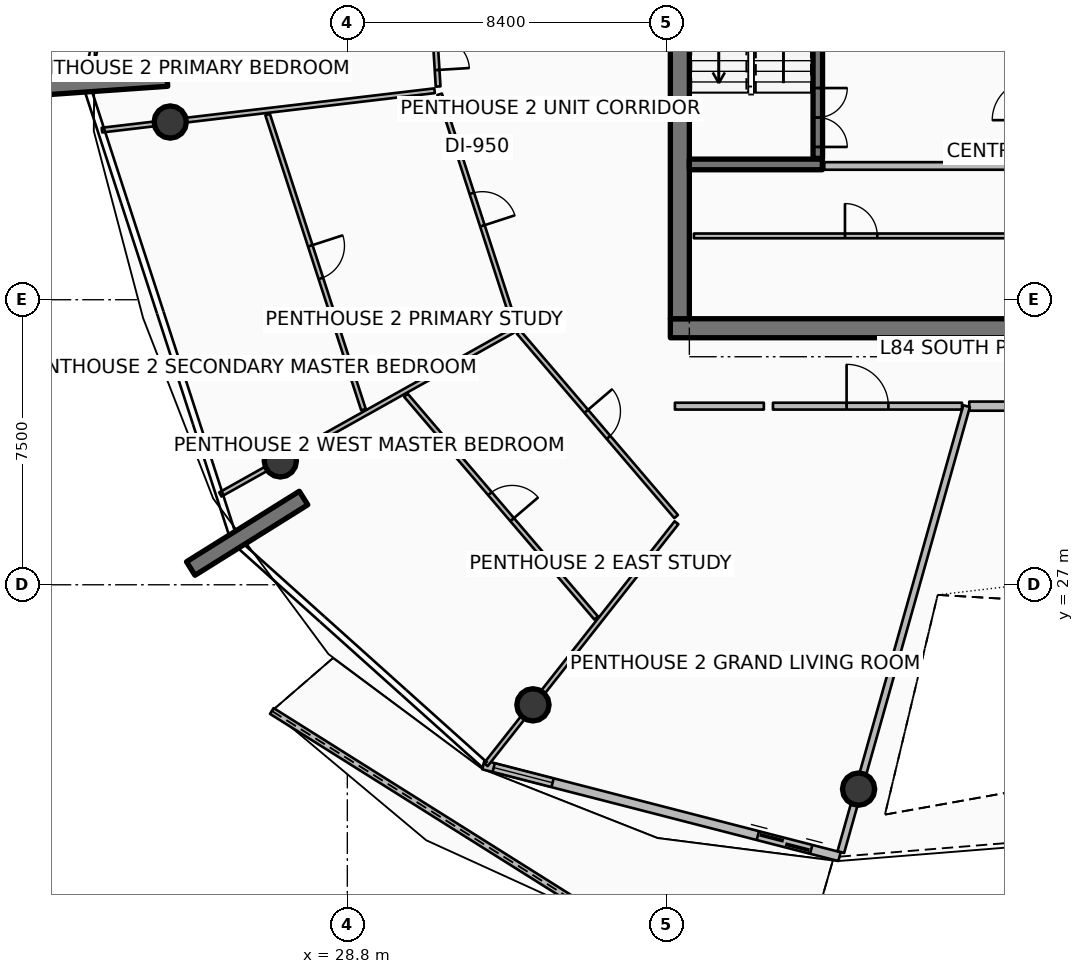
"""IFC4 building model, lengths in metres.
Left out: names, types, materials, properties, quantities, classifications, styles, units other than length and angle.
Written with IfcOpenShell. Run it as: python <this file> out.ifc"""

import sys

from ifc_helpers import new_model, si_unit, direction, frame, frame_2d, origin, origin_2d, place, context, subcontext, project, spatial, polyline, rectangle, circle, outline, extrude, element, fill, save


model = new_model("IFC4")
c1 = context("Model", 3, precision=1e-05, world=origin(), true_north=direction((0.0, 1.0)))
c2 = subcontext(c1, "Body", "Model", "MODEL_VIEW")
j1 = project(units=[si_unit("LENGTHUNIT", "METRE"), si_unit("PLANEANGLEUNIT", "RADIAN")], contexts=[c1])
p1 = place(None, origin())
s1 = spatial("IfcSite", under=j1, at=p1, CompositionType="ELEMENT")
p2 = place(p1, origin())
s2 = spatial("IfcBuilding", under=s1, at=p2, CompositionType="ELEMENT")
p3 = place(p2, frame((0.0, 0.0, 334.7)))
s3 = spatial("IfcBuildingStorey", under=s2, at=p3, CompositionType="ELEMENT", Elevation=334.7)
p4 = place(p3, frame((37.3, 33.75, 0.0), z_axis=(0.0, 0.0, 1.0), x_axis=(1.0, 0.0, 0.0)))
e1 = element("IfcWall", 1, at=p4, inside=s3, PredefinedType="SHEAR", context=c2, shape_type="SweptSolid", body=[
    extrude(rectangle(XDim=9.6, YDim=0.5, at=frame_2d((4.8, 0.0))), origin(), (0.0, 0.0, 1.0), 4.2),
])
p5 = place(p3, frame((37.55, 34.0, 0.0), z_axis=(0.0, 0.0, 1.0), x_axis=(0.0, 1.0, 0.0)))
e2 = element("IfcWall", 2, at=p5, inside=s3, PredefinedType="SHEAR", context=c2, shape_type="SweptSolid", body=[
    extrude(rectangle(XDim=16.0, YDim=0.5, at=frame_2d((8.0, 0.0))), origin(), (0.0, 0.0, 1.0), 4.2),
])
p6 = place(p3, frame((37.8, 38.06, 0.0), z_axis=(0.0, 0.0, 1.0), x_axis=(1.0, 0.0, 0.0)))
e3 = element("IfcWall", 3, at=p6, inside=s3, PredefinedType="SHEAR", context=c2, shape_type="SweptSolid", body=[
    extrude(rectangle(XDim=3.5, YDim=0.28, at=frame_2d((1.75, 0.0))), origin(), (0.0, 0.0, 1.0), 4.2),
])
for number, where, z_axis, x_axis in (
    (4, (24.059, 40.326, 0.0), (0.0, 0.0, 1.0), (-0.998, -0.07, 0.0)),
    (5, (27.647, 29.282, 0.0), (0.0, 0.0, 1.0), (-0.848, -0.53, 0.0)),
):
    element("IfcWall", number, at=place(p3, frame(where, z_axis=z_axis, x_axis=x_axis)), inside=s3, PredefinedType="SOLIDWALL", context=c2, shape_type="SweptSolid", body=[
        extrude(rectangle(XDim=3.5, YDim=0.42, at=frame_2d((1.75, 0.0))), origin(), (0.0, 0.0, 1.0), 4.2),
    ])
for number, where, z_axis, x_axis in (
    (6, (24.14, 39.176, 0.0), (0.0, 0.0, 1.0), (1.0, 0.0, 0.0)),
    (7, (27.037, 30.26, 0.0), (0.0, 0.0, 1.0), (1.0, 0.0, 0.0)),
    (8, (33.684, 23.841, 0.0), (0.0, 0.0, 1.0), (1.0, 0.0, 0.0)),
    (9, (42.253, 21.624, 0.0), (0.0, 0.0, 1.0), (1.0, 0.0, 0.0)),
):
    element("IfcColumn", number, at=place(p3, frame(where, z_axis=z_axis, x_axis=x_axis)), inside=s3, PredefinedType="COLUMN", context=c2, shape_type="SweptSolid", body=[
        extrude(circle(Radius=0.425, at=origin_2d()), origin(), (0.0, 0.0, 1.0), 3.94),
    ])
p7 = place(p3, frame((26.813, 23.679, 0.0), z_axis=(0.0, 0.0, 1.0), x_axis=(0.846699200114, -0.532071860302, 0.0)))
e10 = element("IfcWall", 10, at=p7, inside=s3, PredefinedType="PARAPET", context=c2, shape_type="SweptSolid", body=[
    extrude(outline(polyline([(0.0, 0.0), (10.483, 0.0), (10.483, 1.832), (5.242, 1.696), (0.0, 1.497), (0.0, 0.0)])), frame((0.0, 0.09, 0.0), z_axis=(0.0, -1.0, 0.0), x_axis=(1.0, 0.0, 0.0)), (0.0, 0.0, 1.0), 0.18),
])
p8 = place(p3, frame((32.38, 22.26, 0.0), z_axis=(0.0, 0.0, 1.0), x_axis=(0.968389062354, -0.249444630957, 0.0)))
e11 = element("IfcWall", 11, at=p8, inside=s3, PredefinedType="SOLIDWALL", context=c2, shape_type="SweptSolid", body=[
    extrude(rectangle(XDim=9.678, YDim=0.24, at=frame_2d((4.839, 0.0))), origin(), (0.0, 0.0, 1.0), 2.89),
])
p9 = place(p8, frame((7.458, 0.0, 0.0)))
e12 = element("IfcOpeningElement", 12, at=p9, cuts=e11, PredefinedType="OPENING", context=c2, shape_type="SweptSolid", body=[
    extrude(rectangle(XDim=1.45, YDim=2.15, at=frame_2d((0.725, 1.075))), frame((0.0, 0.13, 0.0), z_axis=(0.0, -1.0, 0.0), x_axis=(1.0, 0.0, 0.0)), (0.0, 0.0, 1.0), 0.26),
])
p10 = place(p8, frame((0.28, 0.0, 0.65)))
e13 = element("IfcOpeningElement", 13, at=p10, cuts=e11, PredefinedType="OPENING", context=c2, shape_type="SweptSolid", body=[
    extrude(rectangle(XDim=1.6, YDim=1.5, at=frame_2d((0.8, 0.75))), frame((0.0, 0.13, 0.0), z_axis=(0.0, -1.0, 0.0), x_axis=(1.0, 0.0, 0.0)), (0.0, 0.0, 1.0), 0.26),
])
p11 = place(p3, frame((41.18, 38.22, 0.0), z_axis=(0.0, 0.0, 1.0), x_axis=(0.0, 1.0, 0.0)))
e14 = element("IfcWall", 14, at=p11, inside=s3, PredefinedType="SOLIDWALL", context=c2, shape_type="SweptSolid", body=[
    extrude(rectangle(XDim=7.56, YDim=0.25, at=frame_2d((3.78, 0.0))), origin(), (0.0, 0.0, 1.0), 3.94),
])
p12 = place(p11, frame((0.3, 0.0, 0.0)))
e15 = element("IfcOpeningElement", 15, at=p12, cuts=e14, PredefinedType="OPENING", context=c2, shape_type="SweptSolid", body=[
    extrude(rectangle(XDim=1.55, YDim=2.15, at=frame_2d((0.775, 1.075))), frame((0.0, 0.135, 0.0), z_axis=(0.0, -1.0, 0.0), x_axis=(1.0, 0.0, 0.0)), (0.0, 0.0, 1.0), 0.27),
])
p13 = place(p3, frame((37.92, 36.18, 0.0), z_axis=(0.0, 0.0, 1.0), x_axis=(1.0, 0.0, 0.0)))
e16 = element("IfcWall", 16, at=p13, inside=s3, PredefinedType="PARTITIONING", context=c2, shape_type="SweptSolid", body=[
    extrude(rectangle(XDim=8.8, YDim=0.125, at=frame_2d((4.4, 0.0))), origin(), (0.0, 0.0, 1.0), 3.38),
])
p14 = place(p13, frame((3.975, 0.0, 0.0)))
e17 = element("IfcOpeningElement", 17, at=p14, cuts=e16, PredefinedType="OPENING", context=c2, shape_type="SweptSolid", body=[
    extrude(rectangle(XDim=0.85, YDim=2.06, at=frame_2d((0.425, 1.03))), frame((0.0, 0.073, 0.0), z_axis=(0.0, -1.0, 0.0), x_axis=(1.0, 0.0, 0.0)), (0.0, 0.0, 1.0), 0.145),
])
p15 = place(p3, frame((41.35, 38.02, 0.0), z_axis=(0.0, 0.0, 1.0), x_axis=(1.0, 0.0, 0.0)))
e18 = element("IfcWall", 18, at=p15, inside=s3, PredefinedType="PARTITIONING", context=c2, shape_type="SweptSolid", body=[
    extrude(rectangle(XDim=5.37, YDim=0.2, at=frame_2d((2.685, 0.0))), origin(), (0.0, 0.0, 1.0), 3.94),
])
p16 = place(p3, frame((45.165, 31.7, 0.0), z_axis=(0.0, 0.0, 1.0), x_axis=(1.0, 0.0, 0.0)))
e19 = element("IfcWall", 19, at=p16, inside=s3, PredefinedType="SOLIDWALL", context=c2, shape_type="SweptSolid", body=[
    extrude(rectangle(XDim=8.533, YDim=0.24, at=frame_2d((4.267, 0.0))), origin(), (0.0, 0.0, 1.0), 3.38),
])
p17 = place(p3, frame((45.095, 31.7, 0.0), z_axis=(0.0, 0.0, 1.0), x_axis=(-0.271453030279, -0.962451688321, 0.0)))
e20 = element("IfcWall", 20, at=p17, inside=s3, PredefinedType="PARTITIONING", context=c2, shape_type="SweptSolid", body=[
    extrude(rectangle(XDim=12.191, YDim=0.18, at=frame_2d((6.096, 0.0))), origin(), (0.0, 0.0, 1.0), 3.38),
])
p18 = place(p3, frame((40.0, 31.7, 0.0), z_axis=(0.0, 0.0, 1.0), x_axis=(1.0, 0.0, 0.0)))
e21 = element("IfcWall", 21, at=p18, inside=s3, PredefinedType="PARTITIONING", context=c2, shape_type="SweptSolid", body=[
    extrude(rectangle(XDim=4.975, YDim=0.18, at=frame_2d((2.488, 0.0))), origin(), (0.0, 0.0, 1.0), 3.38),
])
p19 = place(p18, frame((1.938, 0.0, 0.0)))
e22 = element("IfcOpeningElement", 22, at=p19, cuts=e21, PredefinedType="OPENING", context=c2, shape_type="SweptSolid", body=[
    extrude(rectangle(XDim=1.1, YDim=2.1, at=frame_2d((0.55, 1.05))), frame((0.0, 0.1, 0.0), z_axis=(0.0, -1.0, 0.0), x_axis=(1.0, 0.0, 0.0)), (0.0, 0.0, 1.0), 0.2),
])
p20 = place(p3, frame((31.083, 41.827, 0.0), z_axis=(0.0, 0.0, 1.0), x_axis=(0.061626842896, -0.998099259711, 0.0)))
e23 = element("IfcWall", 23, at=p20, inside=s3, PredefinedType="PARTITIONING", context=c2, shape_type="SweptSolid", body=[
    extrude(rectangle(XDim=1.719, YDim=0.125, at=frame_2d((0.86, 0.0))), origin(), (0.0, 0.0, 1.0), 3.38),
])
p21 = place(p20, frame((0.435, 0.0, 0.0)))
e24 = element("IfcOpeningElement", 24, at=p21, cuts=e23, PredefinedType="OPENING", context=c2, shape_type="SweptSolid", body=[
    extrude(rectangle(XDim=0.85, YDim=2.06, at=frame_2d((0.425, 1.03))), frame((0.0, 0.073, 0.0), z_axis=(0.0, -1.0, 0.0), x_axis=(1.0, 0.0, 0.0)), (0.0, 0.0, 1.0), 0.145),
])
p22 = place(p3, frame((31.096, 39.999, 0.0), z_axis=(0.0, 0.0, 1.0), x_axis=(-0.993069250604, -0.117530691761, 0.0)))
e25 = element("IfcWall", 25, at=p22, inside=s3, PredefinedType="PARTITIONING", context=c2, shape_type="SweptSolid", body=[
    extrude(rectangle(XDim=8.814, YDim=0.125, at=frame_2d((4.407, 0.0))), origin(), (0.0, 0.0, 1.0), 3.38),
])
p23 = place(p3, frame((31.229, 39.906, 0.0), z_axis=(0.0, 0.0, 1.0), x_axis=(0.309023798792, -0.951054305379, 0.0)))
e26 = element("IfcWall", 26, at=p23, inside=s3, PredefinedType="PARTITIONING", context=c2, shape_type="SweptSolid", body=[
    extrude(rectangle(XDim=6.383, YDim=0.125, at=frame_2d((3.191, 0.0))), origin(), (0.0, 0.0, 1.0), 3.38),
])
p24 = place(p23, frame((2.741, 0.0, 0.0)))
e27 = element("IfcOpeningElement", 27, at=p24, cuts=e26, PredefinedType="OPENING", context=c2, shape_type="SweptSolid", body=[
    extrude(rectangle(XDim=0.9, YDim=2.08, at=frame_2d((0.45, 1.04))), frame((0.0, 0.073, 0.0), z_axis=(0.0, -1.0, 0.0), x_axis=(1.0, 0.0, 0.0)), (0.0, 0.0, 1.0), 0.145),
])
p25 = place(p3, frame((26.703, 39.371, 0.0), z_axis=(0.0, 0.0, 1.0), x_axis=(0.309021134762, -0.951055170992, 0.0)))
e28 = element("IfcWall", 28, at=p25, inside=s3, PredefinedType="PARTITIONING", context=c2, shape_type="SweptSolid", body=[
    extrude(rectangle(XDim=8.161, YDim=0.125, at=frame_2d((4.081, 0.0))), origin(), (0.0, 0.0, 1.0), 3.38),
])
p26 = place(p25, frame((3.631, 0.0, 0.0)))
e29 = element("IfcOpeningElement", 29, at=p26, cuts=e28, PredefinedType="OPENING", context=c2, shape_type="SweptSolid", body=[
    extrude(rectangle(XDim=0.9, YDim=2.08, at=frame_2d((0.45, 1.04))), frame((0.0, 0.073, 0.0), z_axis=(0.0, -1.0, 0.0), x_axis=(1.0, 0.0, 0.0)), (0.0, 0.0, 1.0), 0.145),
])
p27 = place(p3, frame((37.42, 31.7, 0.0), z_axis=(0.0, 0.0, 1.0), x_axis=(1.0, 0.0, 0.0)))
e30 = element("IfcWall", 30, at=p27, inside=s3, PredefinedType="PARTITIONING", context=c2, shape_type="SweptSolid", body=[
    extrude(rectangle(XDim=2.34, YDim=0.18, at=frame_2d((1.17, 0.0))), origin(), (0.0, 0.0, 1.0), 3.38),
])
p28 = place(p3, frame((33.148, 33.683, 0.0), z_axis=(0.0, 0.0, 1.0), x_axis=(-0.872504598877, -0.488605899409, 0.0)))
e31 = element("IfcWall", 31, at=p28, inside=s3, PredefinedType="PARTITIONING", context=c2, shape_type="SweptSolid", body=[
    extrude(rectangle(XDim=8.814, YDim=0.125, at=frame_2d((4.407, 0.0))), origin(), (0.0, 0.0, 1.0), 3.38),
])
p29 = place(p3, frame((37.462, 28.632, 0.0), z_axis=(0.0, 0.0, 1.0), x_axis=(-0.619099165969, -0.78531281837, 0.0)))
e32 = element("IfcWall", 32, at=p29, inside=s3, PredefinedType="PARTITIONING", context=c2, shape_type="SweptSolid", body=[
    extrude(rectangle(XDim=8.105, YDim=0.125, at=frame_2d((4.052, 0.0))), origin(), (0.0, 0.0, 1.0), 3.38),
])
p30 = place(p3, frame((33.307, 33.648, 0.0), z_axis=(0.0, 0.0, 1.0), x_axis=(0.649467421322, -0.760389419075, 0.0)))
e33 = element("IfcWall", 33, at=p30, inside=s3, PredefinedType="PARTITIONING", context=c2, shape_type="SweptSolid", body=[
    extrude(rectangle(XDim=6.383, YDim=0.125, at=frame_2d((3.191, 0.0))), origin(), (0.0, 0.0, 1.0), 3.38),
])
p31 = place(p30, frame((2.741, 0.0, 0.0)))
e34 = element("IfcOpeningElement", 34, at=p31, cuts=e33, PredefinedType="OPENING", context=c2, shape_type="SweptSolid", body=[
    extrude(rectangle(XDim=0.9, YDim=2.08, at=frame_2d((0.45, 1.04))), frame((0.0, 0.073, 0.0), z_axis=(0.0, -1.0, 0.0), x_axis=(1.0, 0.0, 0.0)), (0.0, 0.0, 1.0), 0.145),
])
p32 = place(p3, frame((30.341, 31.987, 0.0), z_axis=(0.0, 0.0, 1.0), x_axis=(0.649457620817, -0.760397789819, 0.0)))
e35 = element("IfcWall", 35, at=p32, inside=s3, PredefinedType="PARTITIONING", context=c2, shape_type="SweptSolid", body=[
    extrude(rectangle(XDim=7.709, YDim=0.125, at=frame_2d((3.854, 0.0))), origin(), (0.0, 0.0, 1.0), 3.38),
])
p33 = place(p32, frame((3.405, 0.0, 0.0)))
e36 = element("IfcOpeningElement", 36, at=p33, cuts=e35, PredefinedType="OPENING", context=c2, shape_type="SweptSolid", body=[
    extrude(rectangle(XDim=0.9, YDim=2.08, at=frame_2d((0.45, 1.04))), frame((0.0, 0.073, 0.0), z_axis=(0.0, -1.0, 0.0), x_axis=(1.0, 0.0, 0.0)), (0.0, 0.0, 1.0), 0.145),
])
p34 = place(p9, origin())
e37 = element("IfcDoor", 37, at=p34, inside=s3, OperationType="DOUBLE_DOOR_SLIDING", PredefinedType="DOOR", context=c2, shape_type="SweptSolid", body=[
    extrude(rectangle(XDim=1.45, YDim=2.15, at=frame_2d((0.725, 1.075))), frame((0.0, 0.025, 0.0), z_axis=(0.0, -1.0, 0.0), x_axis=(1.0, 0.0, 0.0)), (0.0, 0.0, 1.0), 0.05),
])
fill(e12, e37)
p35 = place(p10, origin())
e38 = element("IfcWindow", 38, at=p35, inside=s3, PartitioningType="SINGLE_PANEL", PredefinedType="WINDOW", context=c2, shape_type="SweptSolid", body=[
    extrude(rectangle(XDim=1.6, YDim=1.5, at=frame_2d((0.8, 0.75))), frame((0.0, 0.03, 0.0), z_axis=(0.0, -1.0, 0.0), x_axis=(1.0, 0.0, 0.0)), (0.0, 0.0, 1.0), 0.06),
])
fill(e13, e38)
p36 = place(p12, origin())
e39 = element("IfcDoor", 39, at=p36, inside=s3, OperationType="DOUBLE_DOOR_SINGLE_SWING", PredefinedType="DOOR", context=c2, shape_type="SweptSolid", body=[
    extrude(rectangle(XDim=1.55, YDim=2.15, at=frame_2d((0.775, 1.075))), frame((0.0, 0.025, 0.0), z_axis=(0.0, -1.0, 0.0), x_axis=(1.0, 0.0, 0.0)), (0.0, 0.0, 1.0), 0.05),
])
fill(e15, e39)
p37 = place(p14, origin())
e40 = element("IfcDoor", 40, at=p37, inside=s3, OperationType="SINGLE_SWING_LEFT", PredefinedType="DOOR", context=c2, shape_type="SweptSolid", body=[
    extrude(rectangle(XDim=0.85, YDim=2.06, at=frame_2d((0.425, 1.03))), frame((0.0, 0.025, 0.0), z_axis=(0.0, -1.0, 0.0), x_axis=(1.0, 0.0, 0.0)), (0.0, 0.0, 1.0), 0.05),
])
fill(e17, e40)
p38 = place(p19, origin())
e41 = element("IfcDoor", 41, at=p38, inside=s3, OperationType="SINGLE_SWING_LEFT", PredefinedType="DOOR", context=c2, shape_type="SweptSolid", body=[
    extrude(rectangle(XDim=1.1, YDim=2.1, at=frame_2d((0.55, 1.05))), frame((0.0, 0.025, 0.0), z_axis=(0.0, -1.0, 0.0), x_axis=(1.0, 0.0, 0.0)), (0.0, 0.0, 1.0), 0.05),
])
fill(e22, e41)
p39 = place(p21, origin())
e42 = element("IfcDoor", 42, at=p39, inside=s3, OperationType="SINGLE_SWING_RIGHT", PredefinedType="DOOR", context=c2, shape_type="SweptSolid", body=[
    extrude(rectangle(XDim=0.85, YDim=2.06, at=frame_2d((0.425, 1.03))), frame((0.0, 0.025, 0.0), z_axis=(0.0, -1.0, 0.0), x_axis=(1.0, 0.0, 0.0)), (0.0, 0.0, 1.0), 0.05),
])
fill(e24, e42)
p40 = place(p24, origin())
e43 = element("IfcDoor", 43, at=p40, inside=s3, OperationType="SINGLE_SWING_RIGHT", PredefinedType="DOOR", context=c2, shape_type="SweptSolid", body=[
    extrude(rectangle(XDim=0.9, YDim=2.08, at=frame_2d((0.45, 1.04))), frame((0.0, 0.025, 0.0), z_axis=(0.0, -1.0, 0.0), x_axis=(1.0, 0.0, 0.0)), (0.0, 0.0, 1.0), 0.05),
])
fill(e27, e43)
p41 = place(p26, origin())
e44 = element("IfcDoor", 44, at=p41, inside=s3, OperationType="SINGLE_SWING_LEFT", PredefinedType="DOOR", context=c2, shape_type="SweptSolid", body=[
    extrude(rectangle(XDim=0.9, YDim=2.08, at=frame_2d((0.45, 1.04))), frame((0.0, 0.025, 0.0), z_axis=(0.0, -1.0, 0.0), x_axis=(1.0, 0.0, 0.0)), (0.0, 0.0, 1.0), 0.05),
])
fill(e29, e44)
p42 = place(p31, origin())
e45 = element("IfcDoor", 45, at=p42, inside=s3, OperationType="SINGLE_SWING_LEFT", PredefinedType="DOOR", context=c2, shape_type="SweptSolid", body=[
    extrude(rectangle(XDim=0.9, YDim=2.08, at=frame_2d((0.45, 1.04))), frame((0.0, 0.025, 0.0), z_axis=(0.0, -1.0, 0.0), x_axis=(1.0, 0.0, 0.0)), (0.0, 0.0, 1.0), 0.05),
])
fill(e34, e45)
p43 = place(p33, origin())
e46 = element("IfcDoor", 46, at=p43, inside=s3, OperationType="SINGLE_SWING_RIGHT", PredefinedType="DOOR", context=c2, shape_type="SweptSolid", body=[
    extrude(rectangle(XDim=0.9, YDim=2.08, at=frame_2d((0.45, 1.04))), frame((0.0, 0.025, 0.0), z_axis=(0.0, -1.0, 0.0), x_axis=(1.0, 0.0, 0.0)), (0.0, 0.0, 1.0), 0.05),
])
fill(e36, e46)
save(model, sys.argv[1])
